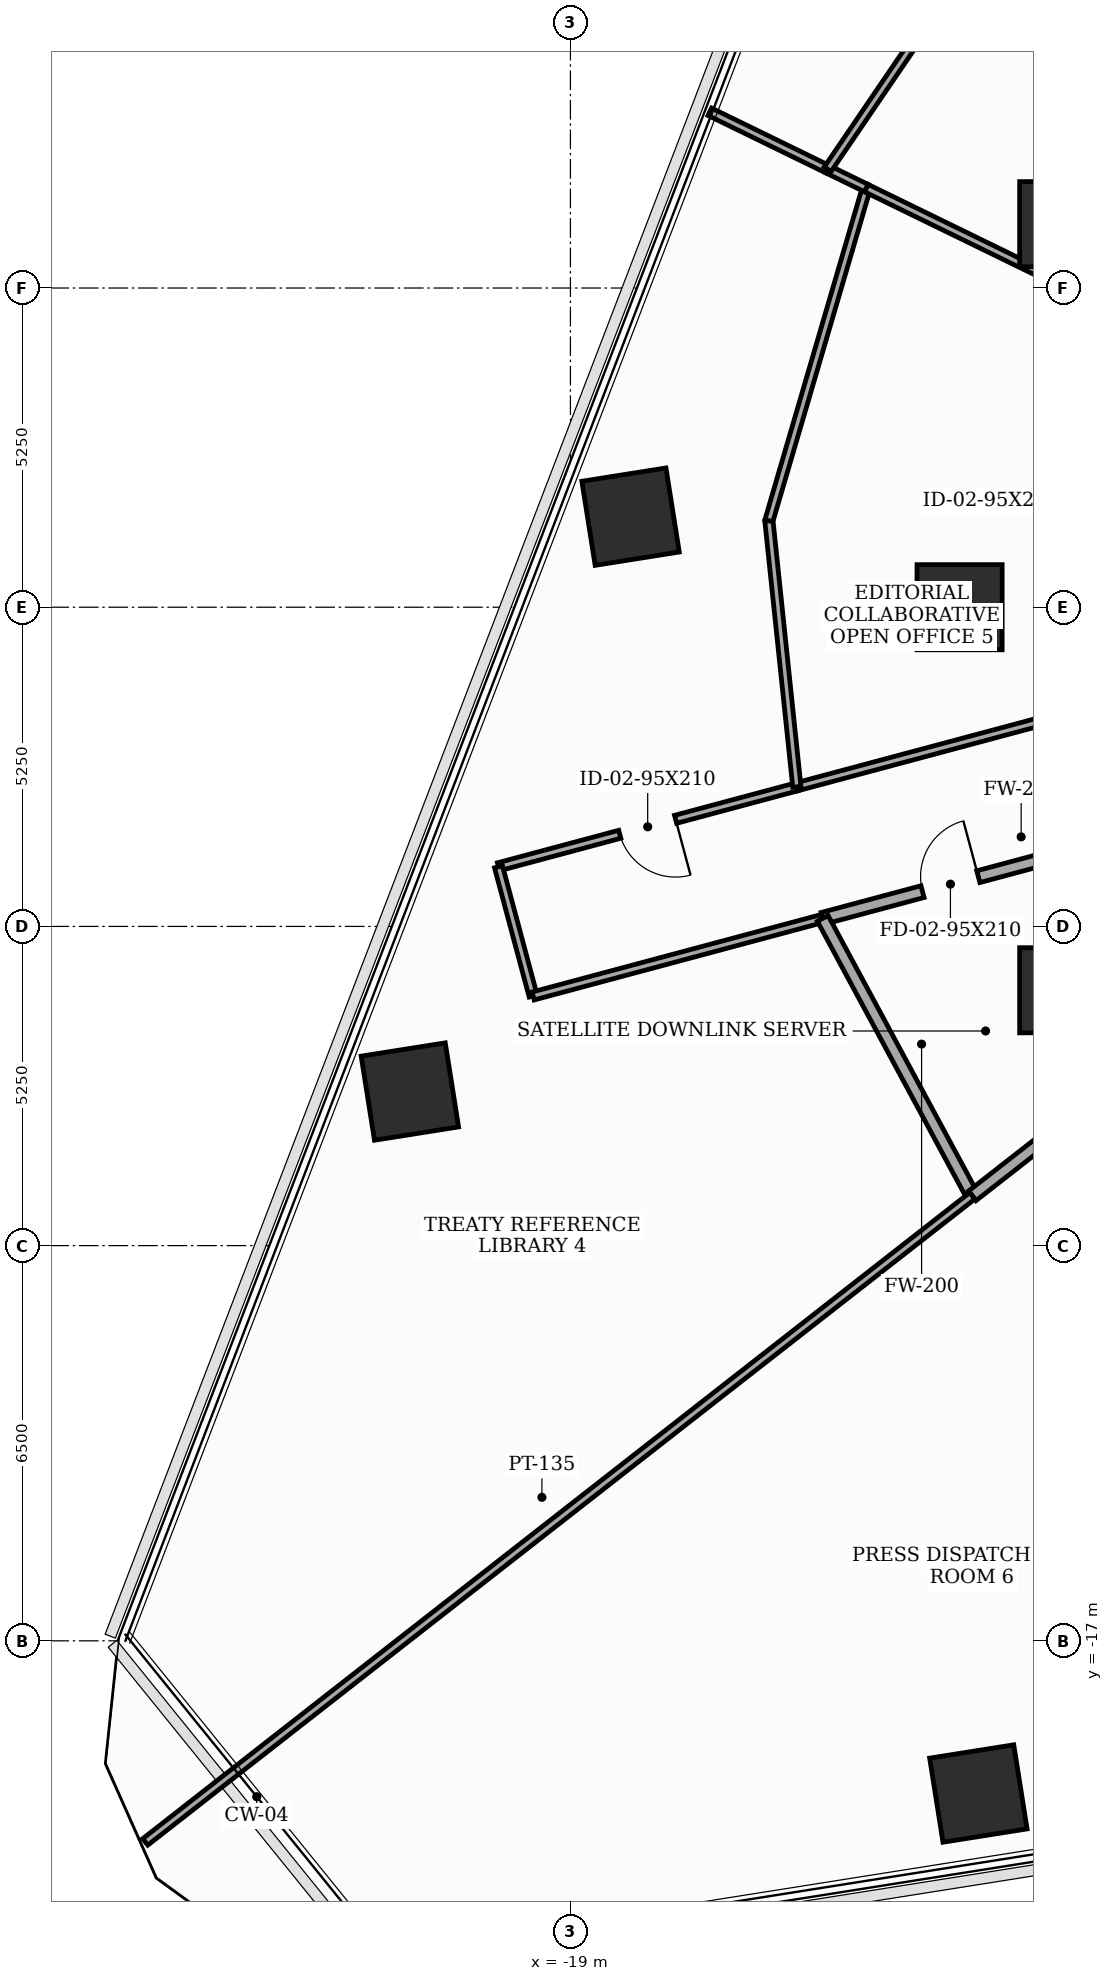
"""IFC4 building model, lengths in metres.
Left out: names, types, materials, properties, quantities, classifications, styles, units other than length and angle.
Written with IfcOpenShell. Run it as: python <this file> out.ifc"""

import sys

from ifc_helpers import new_model, si_unit, direction, frame, frame_2d, origin, origin_2d, place, context, subcontext, project, spatial, rectangle, extrude, element, fill, save


model = new_model("IFC4")
c1 = context("Model", 3, precision=1e-05, world=origin(), true_north=direction((0.0, 1.0)))
c2 = subcontext(c1, "Body", "Model", "MODEL_VIEW")
j1 = project(units=[si_unit("LENGTHUNIT", "METRE"), si_unit("PLANEANGLEUNIT", "RADIAN")], contexts=[c1])
p1 = place(None, origin())
s1 = spatial("IfcSite", under=j1, at=p1, CompositionType="ELEMENT")
p2 = place(p1, origin())
s2 = spatial("IfcBuilding", under=s1, at=p2, CompositionType="ELEMENT")
p3 = place(p2, frame((0.0, 0.0, 77.8)))
s3 = spatial("IfcBuildingStorey", under=s2, at=p3, CompositionType="ELEMENT", Elevation=77.8)
for number, where, z_axis, x_axis in (
    (1, (-10.912, 6.3, 0.0), (0.0, 0.0, 1.0), (1.0, 0.0, 0.0)),
    (2, (-12.6, 0.0, 0.0), (0.0, 0.0, 1.0), (1.0, 0.0, 0.0)),
    (3, (-10.912, -6.3, 0.0), (0.0, 0.0, 1.0), (1.0, 0.0, 0.0)),
    (4, (-12.291, -19.511, 0.0), (0.0, 0.0, 1.0), (0.988, 0.156, 0.0)),
    (5, (-18.011, 1.49, 0.0), (0.0, 0.0, 1.0), (0.988, 0.156, 0.0)),
    (6, (-21.641, -7.966, 0.0), (0.0, 0.0, 1.0), (0.988, 0.156, 0.0)),
):
    element("IfcColumn", number, at=place(p3, frame(where, z_axis=z_axis, x_axis=x_axis)), inside=s3, PredefinedType="COLUMN", context=c2, shape_type="SweptSolid", body=[
        extrude(rectangle(XDim=1.4, YDim=1.4, at=origin_2d()), origin(), (0.0, 0.0, 1.0), 3.7),
    ])
p4 = place(p3, frame((-14.851, -5.118, 0.0), z_axis=(0.0, 0.0, 1.0), x_axis=(0.965909963178, 0.258878239783, 0.0)))
e7 = element("IfcWall", 7, at=p4, inside=s3, PredefinedType="SOLIDWALL", context=c2, shape_type="SweptSolid", body=[
    extrude(rectangle(XDim=4.349, YDim=0.2, at=frame_2d((2.175, 0.0))), origin(), (0.0, 0.0, 1.0), 2.785),
])
p5 = place(p4, frame((1.7, 0.0, 0.0)))
e8 = element("IfcOpeningElement", 8, at=p5, cuts=e7, PredefinedType="OPENING", context=c2, shape_type="SweptSolid", body=[
    extrude(rectangle(XDim=0.95, YDim=2.1, at=frame_2d((0.475, 1.05))), frame((0.0, 0.11, 0.0), z_axis=(0.0, -1.0, 0.0), x_axis=(1.0, 0.0, 0.0)), (0.0, 0.0, 1.0), 0.22),
])
p6 = place(p3, frame((-15.276, -2.954, 0.0), z_axis=(0.0, 0.0, 1.0), x_axis=(-0.965923168362, -0.258828964418, 0.0)))
e9 = element("IfcWall", 9, at=p6, inside=s3, PredefinedType="PARTITIONING", context=c2, shape_type="SweptSolid", body=[
    extrude(rectangle(XDim=5.08, YDim=0.135, at=frame_2d((2.54, 0.0))), origin(), (0.0, 0.0, 1.0), 2.935),
])
p7 = place(p6, frame((2.065, 0.0, 0.0)))
e10 = element("IfcOpeningElement", 10, at=p7, cuts=e9, PredefinedType="OPENING", context=c2, shape_type="SweptSolid", body=[
    extrude(rectangle(XDim=0.95, YDim=2.1, at=frame_2d((0.475, 1.05))), frame((0.0, 0.077, 0.0), z_axis=(0.0, -1.0, 0.0), x_axis=(1.0, 0.0, 0.0)), (0.0, 0.0, 1.0), 0.155),
])
p8 = place(p3, frame((-20.183, -4.269, 0.0), z_axis=(0.0, 0.0, 1.0), x_axis=(0.259105843213, -0.965848933329, 0.0)))
e11 = element("IfcWall", 11, at=p8, inside=s3, PredefinedType="PARTITIONING", context=c2, shape_type="SweptSolid", body=[
    extrude(rectangle(XDim=2.2, YDim=0.135, at=frame_2d((1.1, 0.0))), origin(), (0.0, 0.0, 1.0), 2.935),
])
p9 = place(p3, frame((-19.613, -6.394, 0.0), z_axis=(0.0, 0.0, 1.0), x_axis=(0.965917766169, 0.258849124007, 0.0)))
e12 = element("IfcWall", 12, at=p9, inside=s3, PredefinedType="PARTITIONING", context=c2, shape_type="SweptSolid", body=[
    extrude(rectangle(XDim=4.93, YDim=0.135, at=frame_2d((2.465, 0.0))), origin(), (0.0, 0.0, 1.0), 3.085),
])
p10 = place(p3, frame((-10.65, -1.715, 0.0), z_axis=(0.0, 0.0, 1.0), x_axis=(-0.965952601708, -0.258719097196, 0.0)))
e13 = element("IfcWall", 13, at=p10, inside=s3, PredefinedType="PARTITIONING", context=c2, shape_type="SweptSolid", body=[
    extrude(rectangle(XDim=4.789, YDim=0.135, at=frame_2d((2.395, 0.0))), origin(), (0.0, 0.0, 1.0), 2.785),
])
p11 = place(p3, frame((-14.851, -5.118, 0.0), z_axis=(0.0, 0.0, 1.0), x_axis=(0.474543506137, -0.880232049395, 0.0)))
e14 = element("IfcWall", 14, at=p11, inside=s3, PredefinedType="SOLIDWALL", context=c2, shape_type="SweptSolid", body=[
    extrude(rectangle(XDim=5.184, YDim=0.2, at=frame_2d((2.592, 0.0))), origin(), (0.0, 0.0, 1.0), 2.785),
])
p12 = place(p3, frame((-12.391, -9.681, 0.0), z_axis=(0.0, 0.0, 1.0), x_axis=(0.788124883644, 0.615515367624, 0.0)))
e15 = element("IfcWall", 15, at=p12, inside=s3, PredefinedType="SOLIDWALL", context=c2, shape_type="SweptSolid", body=[
    extrude(rectangle(XDim=2.209, YDim=0.2, at=frame_2d((1.104, 0.0))), origin(), (0.0, 0.0, 1.0), 3.5),
])
p13 = place(p3, frame((-15.276, -2.954, 0.0), z_axis=(0.0, 0.0, 1.0), x_axis=(-0.104560622475, 0.994518514774, 0.0)))
e16 = element("IfcWall", 16, at=p13, inside=s3, PredefinedType="PARTITIONING", context=c2, shape_type="SweptSolid", body=[
    extrude(rectangle(XDim=4.401, YDim=0.135, at=frame_2d((2.201, 0.0))), origin(), (0.0, 0.0, 1.0), 2.785),
])
p14 = place(p3, frame((-15.736, 1.423, 0.0), z_axis=(0.0, 0.0, 1.0), x_axis=(0.281231672123, 0.959639904649, 0.0)))
e17 = element("IfcWall", 17, at=p14, inside=s3, PredefinedType="PARTITIONING", context=c2, shape_type="SweptSolid", body=[
    extrude(rectangle(XDim=5.7, YDim=0.135, at=frame_2d((2.85, 0.0))), origin(), (0.0, 0.0, 1.0), 3.5),
])
p15 = place(p3, frame((-25.993, -20.307, 0.0), z_axis=(0.0, 0.0, 1.0), x_axis=(0.788017511585, 0.61565282541, 0.0)))
e18 = element("IfcWall", 18, at=p15, inside=s3, PredefinedType="PARTITIONING", context=c2, shape_type="SweptSolid", body=[
    extrude(rectangle(XDim=17.26, YDim=0.135, at=frame_2d((8.63, 0.0))), origin(), (0.0, 0.0, 1.0), 2.935),
])
p16 = place(p3, frame((-14.769, 7.203, 0.0), z_axis=(0.0, 0.0, 1.0), x_axis=(-0.898774971292, 0.438410254191, 0.0)))
e19 = element("IfcWall", 19, at=p16, inside=s3, PredefinedType="PARTITIONING", context=c2, shape_type="SweptSolid", body=[
    extrude(rectangle(XDim=2.157, YDim=0.135, at=frame_2d((1.079, 0.0))), origin(), (0.0, 0.0, 1.0), 2.935),
])
p17 = place(p3, frame((-14.133, 6.893, 0.0), z_axis=(0.0, 0.0, 1.0), x_axis=(-0.899003804691, 0.437940816949, 0.0)))
e20 = element("IfcWall", 20, at=p17, inside=s3, PredefinedType="PARTITIONING", context=c2, shape_type="SweptSolid", body=[
    extrude(rectangle(XDim=0.708, YDim=0.135, at=frame_2d((0.354, 0.0))), origin(), (0.0, 0.0, 1.0), 3.5),
])
p18 = place(p3, frame((-10.65, 5.194, 0.0), z_axis=(0.0, 0.0, 1.0), x_axis=(-0.898781159743, 0.438397567159, 0.0)))
e21 = element("IfcWall", 21, at=p18, inside=s3, PredefinedType="PARTITIONING", context=c2, shape_type="SweptSolid", body=[
    extrude(rectangle(XDim=3.875, YDim=0.135, at=frame_2d((1.938, 0.0))), origin(), (0.0, 0.0, 1.0), 2.785),
])
p19 = place(p3, frame((-14.769, 7.203, 0.0), z_axis=(0.0, 0.0, 1.0), x_axis=(0.562841259026, 0.826565010836, 0.0)))
e22 = element("IfcWall", 22, at=p19, inside=s3, PredefinedType="PARTITIONING", context=c2, shape_type="SweptSolid", body=[
    extrude(rectangle(XDim=5.153, YDim=0.135, at=frame_2d((2.576, 0.0))), origin(), (0.0, 0.0, 1.0), 2.785),
])
p20 = place(p5, origin())
e23 = element("IfcDoor", 23, at=p20, inside=s3, OperationType="SINGLE_SWING_RIGHT", PredefinedType="DOOR", context=c2, shape_type="SweptSolid", body=[
    extrude(rectangle(XDim=0.95, YDim=2.1, at=frame_2d((0.475, 1.05))), frame((0.0, 0.025, 0.0), z_axis=(0.0, -1.0, 0.0), x_axis=(1.0, 0.0, 0.0)), (0.0, 0.0, 1.0), 0.05),
])
fill(e8, e23)
p21 = place(p7, origin())
e24 = element("IfcDoor", 24, at=p21, inside=s3, OperationType="SINGLE_SWING_LEFT", PredefinedType="DOOR", context=c2, shape_type="SweptSolid", body=[
    extrude(rectangle(XDim=0.95, YDim=2.1, at=frame_2d((0.475, 1.05))), frame((0.0, 0.025, 0.0), z_axis=(0.0, -1.0, 0.0), x_axis=(1.0, 0.0, 0.0)), (0.0, 0.0, 1.0), 0.05),
])
fill(e10, e24)
save(model, sys.argv[1])
